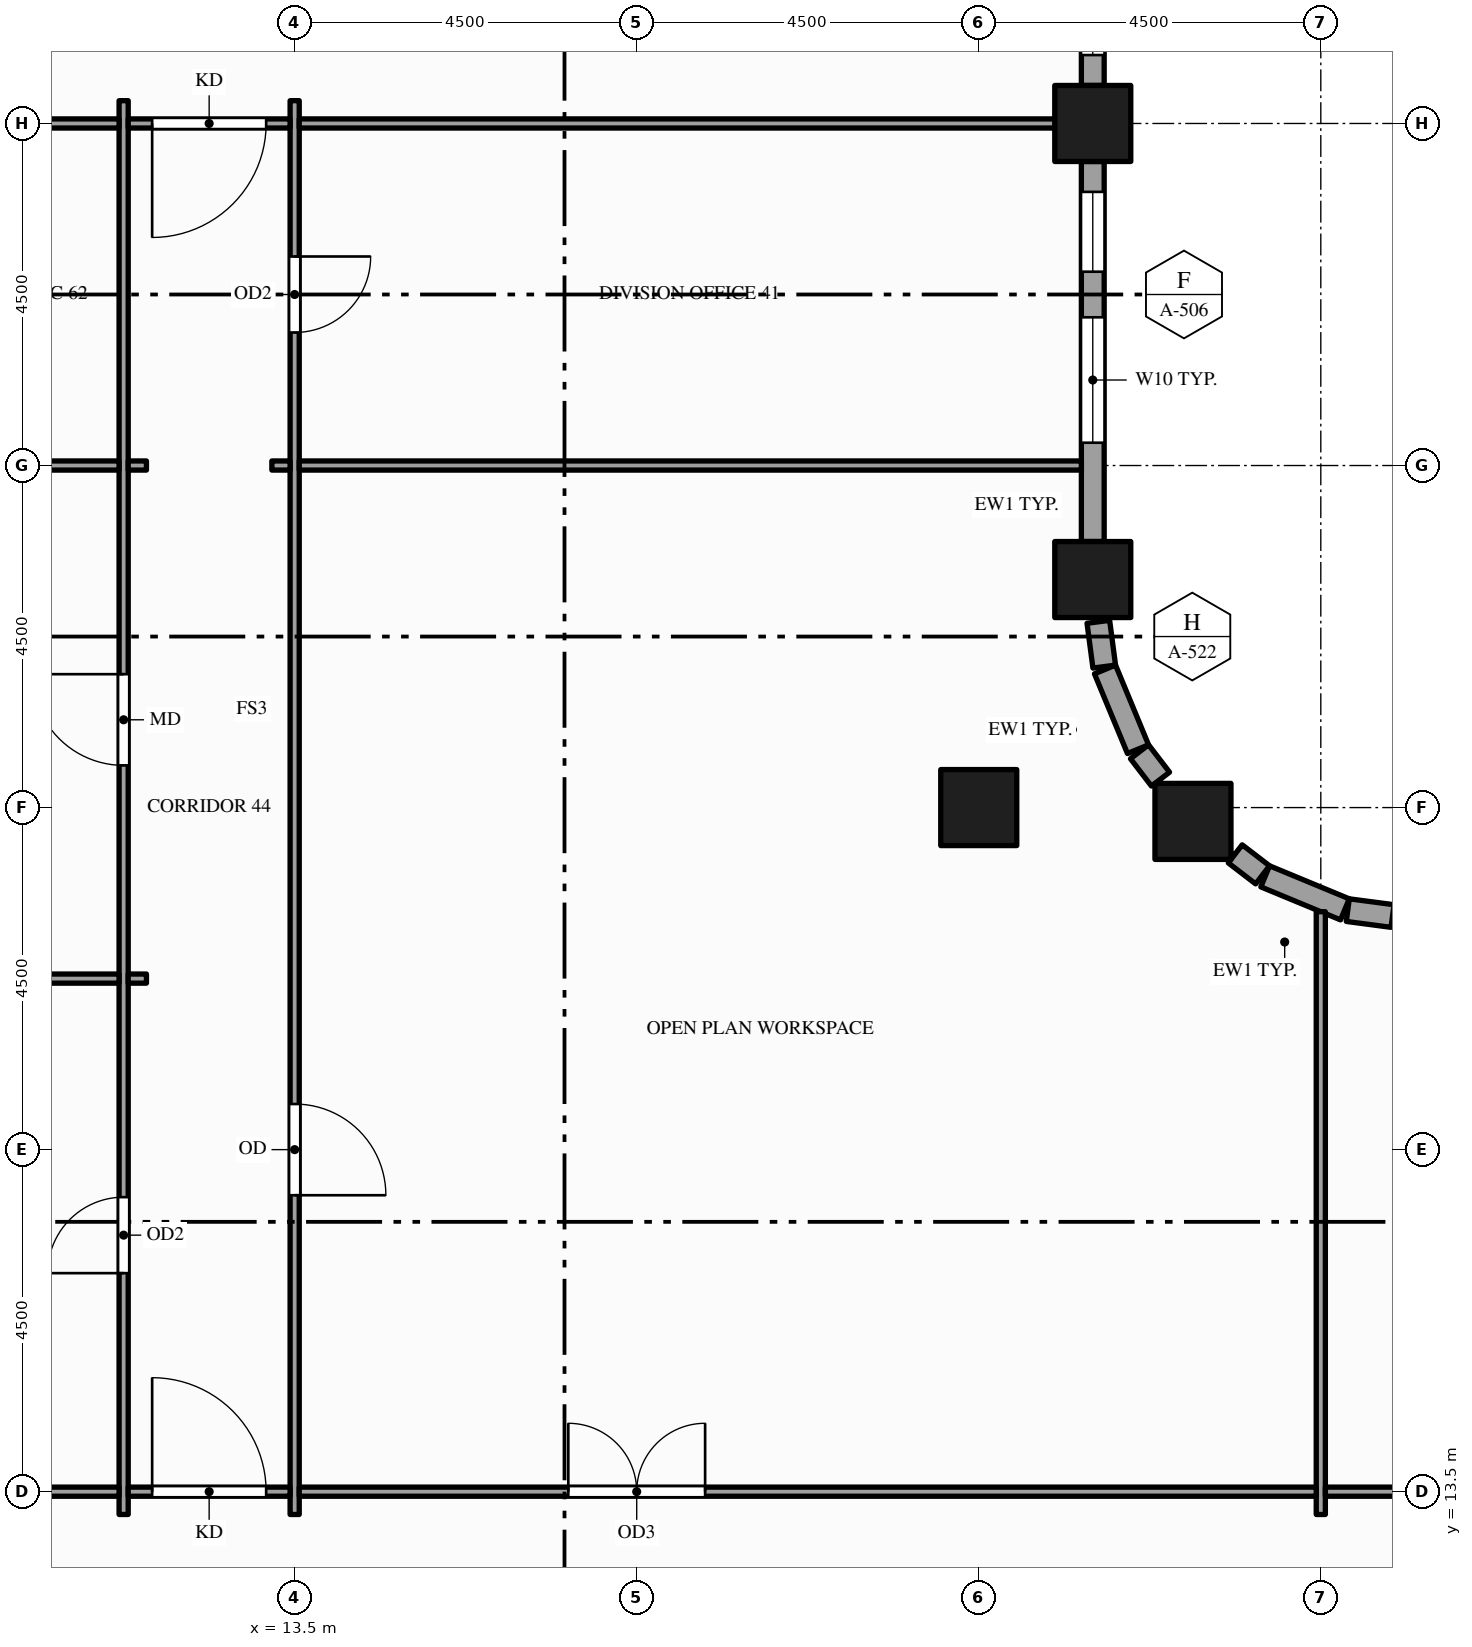
"""IFC4 building model, lengths in metres.
Left out: names, types, materials, properties, quantities, classifications, styles, units other than length and angle.
Written with IfcOpenShell. Run it as: python <this file> out.ifc"""

import sys

from ifc_helpers import new_model, si_unit, direction, frame, frame_2d, origin, origin_2d, place, context, subcontext, project, spatial, rectangle, hollow_rectangle, extrude, element, fill, save


model = new_model("IFC4")
c1 = context("Model", 3, precision=1e-05, world=origin(), true_north=direction((0.0, 1.0)))
c2 = subcontext(c1, "Body", "Model", "MODEL_VIEW")
j1 = project(units=[si_unit("LENGTHUNIT", "METRE"), si_unit("PLANEANGLEUNIT", "RADIAN")], contexts=[c1])
p1 = place(None, origin())
s1 = spatial("IfcSite", under=j1, at=p1, CompositionType="ELEMENT")
p2 = place(p1, origin())
s2 = spatial("IfcBuilding", under=s1, at=p2, CompositionType="ELEMENT")
p3 = place(p2, frame((0.0, 0.0, 83.0)))
s3 = spatial("IfcBuildingStorey", under=s2, at=p3, CompositionType="ELEMENT", Elevation=83.0)
for number, where, z_axis, x_axis in (
    (1, (22.5, 22.5, -0.15), (0.0, 0.0, 1.0), (1.0, 0.0, 0.0)),
    (2, (24.0, 25.5, -0.15), (0.0, 0.0, 1.0), (1.0, 0.0, 0.0)),
    (3, (24.0, 31.5, -0.15), (0.0, 0.0, 1.0), (1.0, 0.0, 0.0)),
    (4, (25.318, 22.318, -0.15), (0.0, 0.0, 1.0), (1.0, 0.0, 0.0)),
):
    element("IfcColumn", number, at=place(p3, frame(where, z_axis=z_axis, x_axis=x_axis)), inside=s3, PredefinedType="COLUMN", context=c2, shape_type="SweptSolid", body=[
        extrude(hollow_rectangle(XDim=1.0, YDim=1.0, WallThickness=0.05, at=origin_2d()), origin(), (0.0, 0.0, 1.0), 4.0),
    ])
p4 = place(p3, frame((27.944, 21.073, 0.0), z_axis=(0.0, 0.0, 1.0), x_axis=(-0.991420685839, 0.130709692412, 0.0)))
e5 = element("IfcWall", 5, at=p4, inside=s3, PredefinedType="STANDARD", context=c2, shape_type="SweptSolid", body=[
    extrude(rectangle(XDim=0.594, YDim=0.3, at=frame_2d((0.297, 0.0))), origin(), (0.0, 0.0, 1.0), 3.154),
])
p5 = place(p3, frame((27.317, 21.161, 0.0), z_axis=(0.0, 0.0, 1.0), x_axis=(-0.923914616768, 0.382598720491, 0.0)))
e6 = element("IfcWall", 6, at=p5, inside=s3, PredefinedType="STANDARD", context=c2, shape_type="SweptSolid", body=[
    extrude(rectangle(XDim=1.135, YDim=0.3, at=frame_2d((0.568, 0.0))), origin(), (0.0, 0.0, 1.0), 2.938),
])
p6 = place(p3, frame((26.234, 21.615, 0.0), z_axis=(0.0, 0.0, 1.0), x_axis=(-0.793563062559, 0.608488016104, 0.0)))
e7 = element("IfcWall", 7, at=p6, inside=s3, PredefinedType="STANDARD", context=c2, shape_type="SweptSolid", body=[
    extrude(rectangle(XDim=0.454, YDim=0.3, at=frame_2d((0.227, 0.0))), origin(), (0.0, 0.0, 1.0), 3.154),
])
p7 = place(p3, frame((24.891, 22.874, 0.0), z_axis=(0.0, 0.0, 1.0), x_axis=(-0.608488016104, 0.793563062559, 0.0)))
e8 = element("IfcWall", 8, at=p7, inside=s3, PredefinedType="STANDARD", context=c2, shape_type="SweptSolid", body=[
    extrude(rectangle(XDim=0.454, YDim=0.3, at=frame_2d((0.227, 0.0))), origin(), (0.0, 0.0, 1.0), 2.76),
])
p8 = place(p3, frame((24.595, 23.268, 0.0), z_axis=(0.0, 0.0, 1.0), x_axis=(-0.382598720491, 0.923914616768, 0.0)))
e9 = element("IfcWall", 9, at=p8, inside=s3, PredefinedType="STANDARD", context=c2, shape_type="SweptSolid", body=[
    extrude(rectangle(XDim=1.135, YDim=0.3, at=frame_2d((0.568, 0.0))), origin(), (0.0, 0.0, 1.0), 3.154),
])
p9 = place(p3, frame((24.151, 24.355, 0.0), z_axis=(0.0, 0.0, 1.0), x_axis=(-0.130709692412, 0.991420685839, 0.0)))
e10 = element("IfcWall", 10, at=p9, inside=s3, PredefinedType="STANDARD", context=c2, shape_type="SweptSolid", body=[
    extrude(rectangle(XDim=0.594, YDim=0.3, at=frame_2d((0.297, 0.0))), origin(), (0.0, 0.0, 1.0), 3.154),
])
p10 = place(p3, frame((24.0, 26.0, 0.0), z_axis=(0.0, 0.0, 1.0), x_axis=(0.0, 1.0, 0.0)))
e11 = element("IfcWall", 11, at=p10, inside=s3, PredefinedType="STANDARD", context=c2, shape_type="SweptSolid", body=[
    extrude(rectangle(XDim=5.0, YDim=0.3, at=frame_2d((2.5, 0.0))), origin(), (0.0, 0.0, 1.0), 3.154),
])
p11 = place(p10, frame((1.3, 0.0, 0.9)))
e12 = element("IfcOpeningElement", 12, at=p11, cuts=e11, PredefinedType="OPENING", context=c2, shape_type="SweptSolid", body=[
    extrude(rectangle(XDim=1.65, YDim=2.0, at=frame_2d((0.825, 1.0))), frame((0.0, 0.16, 0.0), z_axis=(0.0, -1.0, 0.0), x_axis=(1.0, 0.0, 0.0)), (0.0, 0.0, 1.0), 0.32),
])
p12 = place(p10, frame((3.55, 0.0, 0.9)))
e13 = element("IfcOpeningElement", 13, at=p12, cuts=e11, PredefinedType="OPENING", context=c2, shape_type="SweptSolid", body=[
    extrude(rectangle(XDim=1.05, YDim=2.0, at=frame_2d((0.525, 1.0))), frame((0.0, 0.16, 0.0), z_axis=(0.0, -1.0, 0.0), x_axis=(1.0, 0.0, 0.0)), (0.0, 0.0, 1.0), 0.32),
])
p13 = place(p3, frame((24.0, 32.0, 0.0), z_axis=(0.0, 0.0, 1.0), x_axis=(0.0, 1.0, 0.0)))
e14 = element("IfcWall", 14, at=p13, inside=s3, PredefinedType="STANDARD", context=c2, shape_type="SweptSolid", body=[
    extrude(rectangle(XDim=3.5, YDim=0.3, at=frame_2d((1.75, 0.0))), origin(), (0.0, 0.0, 1.0), 3.154),
])
p14 = place(p13, frame((0.4, 0.0, 0.9)))
e15 = element("IfcOpeningElement", 15, at=p14, cuts=e14, PredefinedType="OPENING", context=c2, shape_type="SweptSolid", body=[
    extrude(rectangle(XDim=1.05, YDim=2.0, at=frame_2d((0.525, 1.0))), frame((0.0, 0.16, 0.0), z_axis=(0.0, -1.0, 0.0), x_axis=(1.0, 0.0, 0.0)), (0.0, 0.0, 1.0), 0.32),
])
p15 = place(p13, frame((2.05, 0.0, 0.9)))
e16 = element("IfcOpeningElement", 16, at=p15, cuts=e14, PredefinedType="OPENING", context=c2, shape_type="SweptSolid", body=[
    extrude(rectangle(XDim=1.05, YDim=2.0, at=frame_2d((0.525, 1.0))), frame((0.0, 0.16, 0.0), z_axis=(0.0, -1.0, 0.0), x_axis=(1.0, 0.0, 0.0)), (0.0, 0.0, 1.0), 0.32),
])
p16 = place(p3, frame((11.25, 13.2, 0.0), z_axis=(0.0, 0.0, 1.0), x_axis=(0.0, 1.0, 0.0)))
e17 = element("IfcWall", 17, at=p16, inside=s3, PredefinedType="PARTITIONING", context=c2, shape_type="SweptSolid", body=[
    extrude(rectangle(XDim=18.6, YDim=0.12, at=frame_2d((9.3, 0.0))), origin(), (0.0, 0.0, 1.0), 2.6),
])
p17 = place(p16, frame((3.175, 0.0, 0.0)))
e18 = element("IfcOpeningElement", 18, at=p17, cuts=e17, PredefinedType="OPENING", context=c2, shape_type="SweptSolid", body=[
    extrude(rectangle(XDim=1.0, YDim=2.1, at=frame_2d((0.5, 1.05))), frame((0.0, 0.07, 0.0), z_axis=(0.0, -1.0, 0.0), x_axis=(1.0, 0.0, 0.0)), (0.0, 0.0, 1.0), 0.14),
])
p18 = place(p16, frame((9.855, 0.0, 0.0)))
e19 = element("IfcOpeningElement", 19, at=p18, cuts=e17, PredefinedType="OPENING", context=c2, shape_type="SweptSolid", body=[
    extrude(rectangle(XDim=1.2, YDim=2.1, at=frame_2d((0.6, 1.05))), frame((0.0, 0.07, 0.0), z_axis=(0.0, -1.0, 0.0), x_axis=(1.0, 0.0, 0.0)), (0.0, 0.0, 1.0), 0.14),
])
p19 = place(p3, frame((13.5, 13.2, 0.0), z_axis=(0.0, 0.0, 1.0), x_axis=(0.0, 1.0, 0.0)))
e20 = element("IfcWall", 20, at=p19, inside=s3, PredefinedType="PARTITIONING", context=c2, shape_type="SweptSolid", body=[
    extrude(rectangle(XDim=18.6, YDim=0.12, at=frame_2d((9.3, 0.0))), origin(), (0.0, 0.0, 1.0), 2.6),
])
p20 = place(p19, frame((15.55, 0.0, 0.0)))
e21 = element("IfcOpeningElement", 21, at=p20, cuts=e20, PredefinedType="OPENING", context=c2, shape_type="SweptSolid", body=[
    extrude(rectangle(XDim=1.0, YDim=2.1, at=frame_2d((0.5, 1.05))), frame((0.0, 0.07, 0.0), z_axis=(0.0, -1.0, 0.0), x_axis=(1.0, 0.0, 0.0)), (0.0, 0.0, 1.0), 0.14),
])
p21 = place(p19, frame((4.2, 0.0, 0.0)))
e22 = element("IfcOpeningElement", 22, at=p21, cuts=e20, PredefinedType="OPENING", context=c2, shape_type="SweptSolid", body=[
    extrude(rectangle(XDim=1.2, YDim=2.1, at=frame_2d((0.6, 1.05))), frame((0.0, 0.07, 0.0), z_axis=(0.0, -1.0, 0.0), x_axis=(1.0, 0.0, 0.0)), (0.0, 0.0, 1.0), 0.14),
])
p22 = place(p3, frame((27.0, 13.2, 0.0), z_axis=(0.0, 0.0, 1.0), x_axis=(0.0, 1.0, 0.0)))
e23 = element("IfcWall", 23, at=p22, inside=s3, PredefinedType="PARTITIONING", context=c2, shape_type="SweptSolid", body=[
    extrude(rectangle(XDim=7.93, YDim=0.12, at=frame_2d((3.965, 0.0))), origin(), (0.0, 0.0, 1.0), 2.938),
])
p23 = place(p3, frame((0.15, 13.5, 0.0), z_axis=(0.0, 0.0, 1.0), x_axis=(1.0, 0.0, 0.0)))
e24 = element("IfcWall", 24, at=p23, inside=s3, PredefinedType="PARTITIONING", context=c2, shape_type="SweptSolid", body=[
    extrude(rectangle(XDim=11.04, YDim=0.12, at=frame_2d((5.52, 0.0))), origin(), (0.0, 0.0, 1.0), 2.938),
])
p24 = place(p3, frame((11.31, 13.5, 0.0), z_axis=(0.0, 0.0, 1.0), x_axis=(1.0, 0.0, 0.0)))
e25 = element("IfcWall", 25, at=p24, inside=s3, PredefinedType="PARTITIONING", context=c2, shape_type="SweptSolid", body=[
    extrude(rectangle(XDim=2.13, YDim=0.12, at=frame_2d((1.065, 0.0))), origin(), (0.0, 0.0, 1.0), 2.938),
])
p25 = place(p24, frame((0.315, 0.0, 0.0)))
e26 = element("IfcOpeningElement", 26, at=p25, cuts=e25, PredefinedType="OPENING", context=c2, shape_type="SweptSolid", body=[
    extrude(rectangle(XDim=1.5, YDim=2.1, at=frame_2d((0.75, 1.05))), frame((0.0, 0.07, 0.0), z_axis=(0.0, -1.0, 0.0), x_axis=(1.0, 0.0, 0.0)), (0.0, 0.0, 1.0), 0.14),
])
p26 = place(p3, frame((13.56, 13.5, 0.0), z_axis=(0.0, 0.0, 1.0), x_axis=(1.0, 0.0, 0.0)))
e27 = element("IfcWall", 27, at=p26, inside=s3, PredefinedType="PARTITIONING", context=c2, shape_type="SweptSolid", body=[
    extrude(rectangle(XDim=13.38, YDim=0.12, at=frame_2d((6.69, 0.0))), origin(), (0.0, 0.0, 1.0), 2.76),
])
p27 = place(p26, frame((3.54, 0.0, 0.0)))
e28 = element("IfcOpeningElement", 28, at=p27, cuts=e27, PredefinedType="OPENING", context=c2, shape_type="SweptSolid", body=[
    extrude(rectangle(XDim=1.8, YDim=2.1, at=frame_2d((0.9, 1.05))), frame((0.0, 0.07, 0.0), z_axis=(0.0, -1.0, 0.0), x_axis=(1.0, 0.0, 0.0)), (0.0, 0.0, 1.0), 0.14),
])
p28 = place(p3, frame((27.06, 13.5, 0.0), z_axis=(0.0, 0.0, 1.0), x_axis=(1.0, 0.0, 0.0)))
e29 = element("IfcWall", 29, at=p28, inside=s3, PredefinedType="PARTITIONING", context=c2, shape_type="SweptSolid", body=[
    extrude(rectangle(XDim=4.38, YDim=0.12, at=frame_2d((2.19, 0.0))), origin(), (0.0, 0.0, 1.0), 2.938),
])
p29 = place(p28, frame((1.69, 0.0, 0.0)))
e30 = element("IfcOpeningElement", 30, at=p29, cuts=e29, PredefinedType="OPENING", context=c2, shape_type="SweptSolid", body=[
    extrude(rectangle(XDim=1.0, YDim=2.1, at=frame_2d((0.5, 1.05))), frame((0.0, 0.07, 0.0), z_axis=(0.0, -1.0, 0.0), x_axis=(1.0, 0.0, 0.0)), (0.0, 0.0, 1.0), 0.14),
])
p30 = place(p3, frame((0.15, 20.25, 0.0), z_axis=(0.0, 0.0, 1.0), x_axis=(1.0, 0.0, 0.0)))
e31 = element("IfcWall", 31, at=p30, inside=s3, PredefinedType="PARTITIONING", context=c2, shape_type="SweptSolid", body=[
    extrude(rectangle(XDim=11.04, YDim=0.12, at=frame_2d((5.52, 0.0))), origin(), (0.0, 0.0, 1.0), 2.938),
])
p31 = place(p3, frame((11.31, 20.25, 0.0), z_axis=(0.0, 0.0, 1.0), x_axis=(1.0, 0.0, 0.0)))
e32 = element("IfcWall", 32, at=p31, inside=s3, PredefinedType="PARTITIONING", context=c2, shape_type="SweptSolid", body=[
    extrude(rectangle(XDim=0.24, YDim=0.12, at=frame_2d((0.12, 0.0))), origin(), (0.0, 0.0, 1.0), 2.938),
])
p32 = place(p3, frame((8.06, 27.0, 0.0), z_axis=(0.0, 0.0, 1.0), x_axis=(1.0, 0.0, 0.0)))
e33 = element("IfcWall", 33, at=p32, inside=s3, PredefinedType="PARTITIONING", context=c2, shape_type="SweptSolid", body=[
    extrude(rectangle(XDim=3.13, YDim=0.12, at=frame_2d((1.565, 0.0))), origin(), (0.0, 0.0, 1.0), 2.938),
])
for number, where, z_axis, x_axis in (
    (34, (11.31, 27.0, 0.0), (0.0, 0.0, 1.0), (1.0, 0.0, 0.0)),
    (35, (13.2, 27.0, 0.0), (0.0, 0.0, 1.0), (1.0, 0.0, 0.0)),
):
    element("IfcWall", number, at=place(p3, frame(where, z_axis=z_axis, x_axis=x_axis)), inside=s3, PredefinedType="PARTITIONING", context=c2, shape_type="SweptSolid", body=[
        extrude(rectangle(XDim=0.24, YDim=0.12, at=frame_2d((0.12, 0.0))), origin(), (0.0, 0.0, 1.0), 2.938),
    ])
p33 = place(p3, frame((13.56, 27.0, 0.0), z_axis=(0.0, 0.0, 1.0), x_axis=(1.0, 0.0, 0.0)))
e36 = element("IfcWall", 36, at=p33, inside=s3, PredefinedType="PARTITIONING", context=c2, shape_type="SweptSolid", body=[
    extrude(rectangle(XDim=10.29, YDim=0.12, at=frame_2d((5.145, 0.0))), origin(), (0.0, 0.0, 1.0), 2.938),
])
p34 = place(p3, frame((8.06, 31.5, 0.0), z_axis=(0.0, 0.0, 1.0), x_axis=(1.0, 0.0, 0.0)))
e37 = element("IfcWall", 37, at=p34, inside=s3, PredefinedType="PARTITIONING", context=c2, shape_type="SweptSolid", body=[
    extrude(rectangle(XDim=3.13, YDim=0.12, at=frame_2d((1.565, 0.0))), origin(), (0.0, 0.0, 1.0), 2.938),
])
p35 = place(p34, frame((1.065, 0.0, 0.0)))
e38 = element("IfcOpeningElement", 38, at=p35, cuts=e37, PredefinedType="OPENING", context=c2, shape_type="SweptSolid", body=[
    extrude(rectangle(XDim=1.0, YDim=2.1, at=frame_2d((0.5, 1.05))), frame((0.0, 0.07, 0.0), z_axis=(0.0, -1.0, 0.0), x_axis=(1.0, 0.0, 0.0)), (0.0, 0.0, 1.0), 0.14),
])
p36 = place(p3, frame((11.31, 31.5, 0.0), z_axis=(0.0, 0.0, 1.0), x_axis=(1.0, 0.0, 0.0)))
e39 = element("IfcWall", 39, at=p36, inside=s3, PredefinedType="PARTITIONING", context=c2, shape_type="SweptSolid", body=[
    extrude(rectangle(XDim=2.13, YDim=0.12, at=frame_2d((1.065, 0.0))), origin(), (0.0, 0.0, 1.0), 2.938),
])
p37 = place(p36, frame((0.315, 0.0, 0.0)))
e40 = element("IfcOpeningElement", 40, at=p37, cuts=e39, PredefinedType="OPENING", context=c2, shape_type="SweptSolid", body=[
    extrude(rectangle(XDim=1.5, YDim=2.1, at=frame_2d((0.75, 1.05))), frame((0.0, 0.07, 0.0), z_axis=(0.0, -1.0, 0.0), x_axis=(1.0, 0.0, 0.0)), (0.0, 0.0, 1.0), 0.14),
])
p38 = place(p3, frame((13.56, 31.5, 0.0), z_axis=(0.0, 0.0, 1.0), x_axis=(1.0, 0.0, 0.0)))
e41 = element("IfcWall", 41, at=p38, inside=s3, PredefinedType="PARTITIONING", context=c2, shape_type="SweptSolid", body=[
    extrude(rectangle(XDim=10.29, YDim=0.12, at=frame_2d((5.145, 0.0))), origin(), (0.0, 0.0, 1.0), 2.938),
])
p39 = place(p11, origin())
e42 = element("IfcWindow", 42, at=p39, inside=s3, PartitioningType="SINGLE_PANEL", PredefinedType="WINDOW", context=c2, shape_type="SweptSolid", body=[
    extrude(rectangle(XDim=1.65, YDim=2.0, at=frame_2d((0.825, 1.0))), frame((0.0, 0.03, 0.0), z_axis=(0.0, -1.0, 0.0), x_axis=(1.0, 0.0, 0.0)), (0.0, 0.0, 1.0), 0.06),
])
fill(e12, e42)
p40 = place(p12, origin())
e43 = element("IfcWindow", 43, at=p40, inside=s3, PartitioningType="SINGLE_PANEL", PredefinedType="WINDOW", context=c2, shape_type="SweptSolid", body=[
    extrude(rectangle(XDim=1.05, YDim=2.0, at=frame_2d((0.525, 1.0))), frame((0.0, 0.03, 0.0), z_axis=(0.0, -1.0, 0.0), x_axis=(1.0, 0.0, 0.0)), (0.0, 0.0, 1.0), 0.06),
])
fill(e13, e43)
p41 = place(p14, origin())
e44 = element("IfcWindow", 44, at=p41, inside=s3, PartitioningType="SINGLE_PANEL", PredefinedType="WINDOW", context=c2, shape_type="SweptSolid", body=[
    extrude(rectangle(XDim=1.05, YDim=2.0, at=frame_2d((0.525, 1.0))), frame((0.0, 0.03, 0.0), z_axis=(0.0, -1.0, 0.0), x_axis=(1.0, 0.0, 0.0)), (0.0, 0.0, 1.0), 0.06),
])
fill(e15, e44)
p42 = place(p27, origin())
e45 = element("IfcDoor", 45, at=p42, inside=s3, OperationType="DOUBLE_DOOR_SINGLE_SWING", PredefinedType="DOOR", context=c2, shape_type="SweptSolid", body=[
    extrude(rectangle(XDim=1.8, YDim=2.1, at=frame_2d((0.9, 1.05))), frame((0.0, 0.025, 0.0), z_axis=(0.0, -1.0, 0.0), x_axis=(1.0, 0.0, 0.0)), (0.0, 0.0, 1.0), 0.05),
])
fill(e28, e45)
p43 = place(p25, origin())
e46 = element("IfcDoor", 46, at=p43, inside=s3, OperationType="SINGLE_SWING_LEFT", PredefinedType="DOOR", context=c2, shape_type="SweptSolid", body=[
    extrude(rectangle(XDim=1.5, YDim=2.1, at=frame_2d((0.75, 1.05))), frame((0.0, 0.025, 0.0), z_axis=(0.0, -1.0, 0.0), x_axis=(1.0, 0.0, 0.0)), (0.0, 0.0, 1.0), 0.05),
])
fill(e26, e46)
p44 = place(p37, origin())
e47 = element("IfcDoor", 47, at=p44, inside=s3, OperationType="SINGLE_SWING_LEFT", PredefinedType="DOOR", context=c2, shape_type="SweptSolid", body=[
    extrude(rectangle(XDim=1.5, YDim=2.1, at=frame_2d((0.75, 1.05))), frame((0.0, 0.025, 0.0), z_axis=(0.0, -1.0, 0.0), x_axis=(1.0, 0.0, 0.0)), (0.0, 0.0, 1.0), 0.05),
])
fill(e40, e47)
p45 = place(p17, origin())
e48 = element("IfcDoor", 48, at=p45, inside=s3, OperationType="SINGLE_SWING_LEFT", PredefinedType="DOOR", context=c2, shape_type="SweptSolid", body=[
    extrude(rectangle(XDim=1.0, YDim=2.1, at=frame_2d((0.5, 1.05))), frame((0.0, 0.025, 0.0), z_axis=(0.0, -1.0, 0.0), x_axis=(1.0, 0.0, 0.0)), (0.0, 0.0, 1.0), 0.05),
])
fill(e18, e48)
p46 = place(p18, origin())
e49 = element("IfcDoor", 49, at=p46, inside=s3, OperationType="SINGLE_SWING_RIGHT", PredefinedType="DOOR", context=c2, shape_type="SweptSolid", body=[
    extrude(rectangle(XDim=1.2, YDim=2.1, at=frame_2d((0.6, 1.05))), frame((0.0, 0.025, 0.0), z_axis=(0.0, -1.0, 0.0), x_axis=(1.0, 0.0, 0.0)), (0.0, 0.0, 1.0), 0.05),
])
fill(e19, e49)
p47 = place(p20, origin())
e50 = element("IfcDoor", 50, at=p47, inside=s3, OperationType="SINGLE_SWING_RIGHT", PredefinedType="DOOR", context=c2, shape_type="SweptSolid", body=[
    extrude(rectangle(XDim=1.0, YDim=2.1, at=frame_2d((0.5, 1.05))), frame((0.0, 0.025, 0.0), z_axis=(0.0, -1.0, 0.0), x_axis=(1.0, 0.0, 0.0)), (0.0, 0.0, 1.0), 0.05),
])
fill(e21, e50)
p48 = place(p21, origin())
e51 = element("IfcDoor", 51, at=p48, inside=s3, OperationType="SINGLE_SWING_LEFT", PredefinedType="DOOR", context=c2, shape_type="SweptSolid", body=[
    extrude(rectangle(XDim=1.2, YDim=2.1, at=frame_2d((0.6, 1.05))), frame((0.0, 0.025, 0.0), z_axis=(0.0, -1.0, 0.0), x_axis=(1.0, 0.0, 0.0)), (0.0, 0.0, 1.0), 0.05),
])
fill(e22, e51)
save(model, sys.argv[1])
